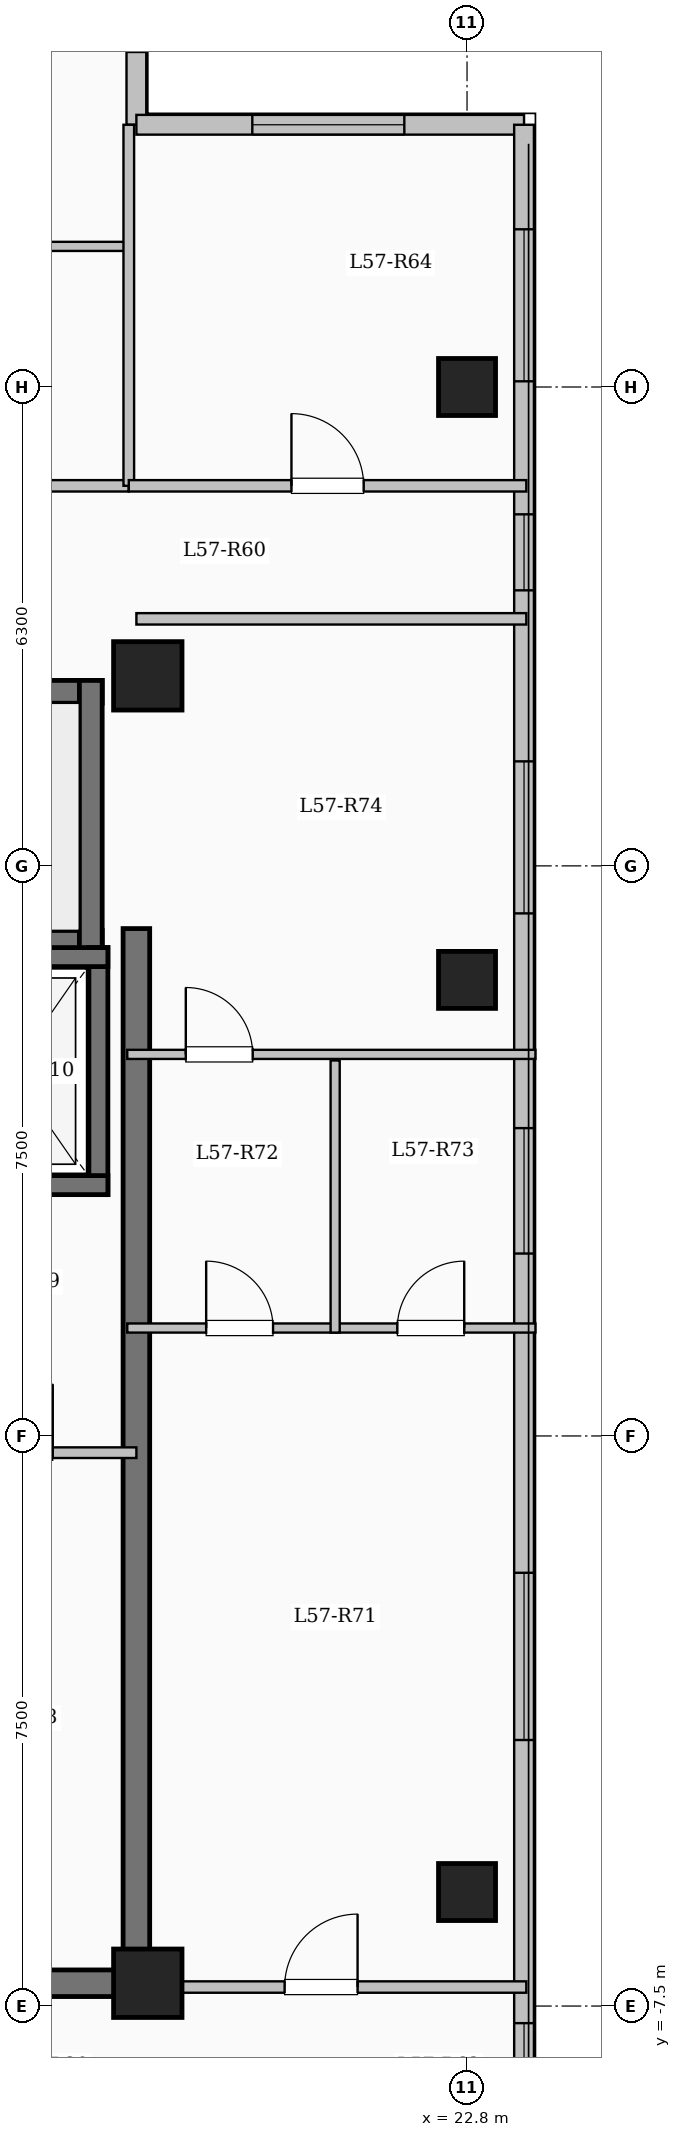
"""IFC4 building model, lengths in metres.
Left out: names, types, materials, properties, quantities, classifications, styles, units other than length and angle.
Written with IfcOpenShell. Run it as: python <this file> out.ifc"""

import sys

from ifc_helpers import new_model, si_unit, direction, frame, frame_2d, origin, origin_2d, place, context, subcontext, project, spatial, rectangle, extrude, element, fill, save


model = new_model("IFC4")
c1 = context("Model", 3, precision=1e-05, world=origin(), true_north=direction((0.0, 1.0)))
c2 = subcontext(c1, "Body", "Model", "MODEL_VIEW")
j1 = project(units=[si_unit("LENGTHUNIT", "METRE"), si_unit("PLANEANGLEUNIT", "RADIAN")], contexts=[c1])
p1 = place(None, origin())
s1 = spatial("IfcSite", under=j1, at=p1, CompositionType="ELEMENT")
p2 = place(p1, origin())
s2 = spatial("IfcBuilding", under=s1, at=p2, CompositionType="ELEMENT")
p3 = place(p2, frame((0.0, 0.0, 210.35)))
s3 = spatial("IfcBuildingStorey", under=s2, at=p3, CompositionType="ELEMENT", Elevation=210.35)
for number, where, z_axis, x_axis in (
    (1, (18.6, -7.2, 0.0), (0.0, 0.0, 1.0), (1.0, 0.0, 0.0)),
    (2, (18.6, 10.0, 0.0), (0.0, 0.0, 1.0), (1.0, 0.0, 0.0)),
):
    element("IfcColumn", number, at=place(p3, frame(where, z_axis=z_axis, x_axis=x_axis)), inside=s3, PredefinedType="COLUMN", context=c2, shape_type="SweptSolid", body=[
        extrude(rectangle(XDim=0.9, YDim=0.9, at=origin_2d()), origin(), (0.0, 0.0, 1.0), 3.35),
    ])
for number, where, z_axis, x_axis in (
    (3, (22.8, -6.0, 0.0), (0.0, 0.0, 1.0), (1.0, 0.0, 0.0)),
    (4, (22.8, 6.0, 0.0), (0.0, 0.0, 1.0), (1.0, 0.0, 0.0)),
    (5, (22.8, 13.8, 0.0), (0.0, 0.0, 1.0), (1.0, 0.0, 0.0)),
):
    element("IfcColumn", number, at=place(p3, frame(where, z_axis=z_axis, x_axis=x_axis)), inside=s3, PredefinedType="COLUMN", context=c2, shape_type="SweptSolid", body=[
        extrude(rectangle(XDim=0.75, YDim=0.75, at=origin_2d()), origin(), (0.0, 0.0, 1.0), 3.35),
    ])
p4 = place(p3, frame((18.45, 20.85, 0.0), z_axis=(0.0, 0.0, 1.0), x_axis=(0.0, -1.0, 0.0)))
e6 = element("IfcWall", 6, at=p4, inside=s3, PredefinedType="SOLIDWALL", context=c2, shape_type="SweptSolid", body=[
    extrude(rectangle(XDim=3.6, YDim=0.26, at=frame_2d((1.8, 0.0))), origin(), (0.0, 0.0, 1.0), 3.1),
])
p5 = place(p4, frame((0.992, 0.0, 0.9)))
e7 = element("IfcOpeningElement", 7, at=p5, cuts=e6, PredefinedType="OPENING", context=c2, shape_type="SweptSolid", body=[
    extrude(rectangle(XDim=1.65, YDim=1.6, at=frame_2d((0.825, 0.8))), frame((0.0, 0.14, 0.0), z_axis=(0.0, -1.0, 0.0), x_axis=(1.0, 0.0, 0.0)), (0.0, 0.0, 1.0), 0.28),
])
p6 = place(p3, frame((18.45, 17.25, 0.0), z_axis=(0.0, 0.0, 1.0), x_axis=(1.0, 0.0, 0.0)))
e8 = element("IfcWall", 8, at=p6, inside=s3, PredefinedType="SOLIDWALL", context=c2, shape_type="SweptSolid", body=[
    extrude(rectangle(XDim=5.1, YDim=0.26, at=frame_2d((2.55, 0.0))), origin(), (0.0, 0.0, 1.0), 3.1),
])
p7 = place(p6, frame((1.525, 0.0, 0.9)))
e9 = element("IfcOpeningElement", 9, at=p7, cuts=e8, PredefinedType="OPENING", context=c2, shape_type="SweptSolid", body=[
    extrude(rectangle(XDim=2.0, YDim=1.7, at=frame_2d((1.0, 0.85))), frame((0.0, 0.14, 0.0), z_axis=(0.0, -1.0, 0.0), x_axis=(1.0, 0.0, 0.0)), (0.0, 0.0, 1.0), 0.28),
])
p8 = place(p3, frame((23.55, 17.25, 0.0), z_axis=(0.0, 0.0, 1.0), x_axis=(0.0, -1.0, 0.0)))
e10 = element("IfcWall", 10, at=p8, inside=s3, PredefinedType="SOLIDWALL", context=c2, shape_type="SweptSolid", body=[
    extrude(rectangle(XDim=34.5, YDim=0.26, at=frame_2d((17.25, 0.0))), origin(), (0.0, 0.0, 1.0), 3.1),
])
p9 = place(p8, frame((1.375, 0.0, 0.9)))
e11 = element("IfcOpeningElement", 11, at=p9, cuts=e10, PredefinedType="OPENING", context=c2, shape_type="SweptSolid", body=[
    extrude(rectangle(XDim=2.0, YDim=1.7, at=frame_2d((1.0, 0.85))), frame((0.0, 0.14, 0.0), z_axis=(0.0, -1.0, 0.0), x_axis=(1.0, 0.0, 0.0)), (0.0, 0.0, 1.0), 0.28),
])
p10 = place(p8, frame((5.125, 0.0, 0.95)))
e12 = element("IfcOpeningElement", 12, at=p10, cuts=e10, PredefinedType="OPENING", context=c2, shape_type="SweptSolid", body=[
    extrude(rectangle(XDim=1.0, YDim=1.5, at=frame_2d((0.5, 0.75))), frame((0.0, 0.14, 0.0), z_axis=(0.0, -1.0, 0.0), x_axis=(1.0, 0.0, 0.0)), (0.0, 0.0, 1.0), 0.28),
])
p11 = place(p8, frame((8.375, 0.0, 0.9)))
e13 = element("IfcOpeningElement", 13, at=p11, cuts=e10, PredefinedType="OPENING", context=c2, shape_type="SweptSolid", body=[
    extrude(rectangle(XDim=2.0, YDim=1.7, at=frame_2d((1.0, 0.85))), frame((0.0, 0.14, 0.0), z_axis=(0.0, -1.0, 0.0), x_axis=(1.0, 0.0, 0.0)), (0.0, 0.0, 1.0), 0.28),
])
p12 = place(p8, frame((13.2, 0.0, 0.9)))
e14 = element("IfcOpeningElement", 14, at=p12, cuts=e10, PredefinedType="OPENING", context=c2, shape_type="SweptSolid", body=[
    extrude(rectangle(XDim=1.65, YDim=1.6, at=frame_2d((0.825, 0.8))), frame((0.0, 0.14, 0.0), z_axis=(0.0, -1.0, 0.0), x_axis=(1.0, 0.0, 0.0)), (0.0, 0.0, 1.0), 0.28),
])
p13 = place(p8, frame((19.05, 0.0, 0.9)))
e15 = element("IfcOpeningElement", 15, at=p13, cuts=e10, PredefinedType="OPENING", context=c2, shape_type="SweptSolid", body=[
    extrude(rectangle(XDim=2.2, YDim=1.75, at=frame_2d((1.1, 0.875))), frame((0.0, 0.14, 0.0), z_axis=(0.0, -1.0, 0.0), x_axis=(1.0, 0.0, 0.0)), (0.0, 0.0, 1.0), 0.28),
])
p14 = place(p8, frame((24.975, 0.0, 0.95)))
e16 = element("IfcOpeningElement", 16, at=p14, cuts=e10, PredefinedType="OPENING", context=c2, shape_type="SweptSolid", body=[
    extrude(rectangle(XDim=1.2, YDim=1.5, at=frame_2d((0.6, 0.75))), frame((0.0, 0.14, 0.0), z_axis=(0.0, -1.0, 0.0), x_axis=(1.0, 0.0, 0.0)), (0.0, 0.0, 1.0), 0.28),
])
p15 = place(p8, frame((29.475, 0.0, 0.9)))
e17 = element("IfcOpeningElement", 17, at=p15, cuts=e10, PredefinedType="OPENING", context=c2, shape_type="SweptSolid", body=[
    extrude(rectangle(XDim=2.2, YDim=1.75, at=frame_2d((1.1, 0.875))), frame((0.0, 0.14, 0.0), z_axis=(0.0, -1.0, 0.0), x_axis=(1.0, 0.0, 0.0)), (0.0, 0.0, 1.0), 0.28),
])
p16 = place(p3, frame((10.0, 9.79, 0.0), z_axis=(0.0, 0.0, 1.0), x_axis=(1.0, 0.0, 0.0)))
e18 = element("IfcWall", 18, at=p16, inside=s3, PredefinedType="SHEAR", context=c2, shape_type="SweptSolid", body=[
    extrude(rectangle(XDim=8.0, YDim=0.3, at=frame_2d((4.0, 0.0))), origin(), (0.0, 0.0, 1.0), 3.35),
])
p17 = place(p3, frame((10.0, 6.5, 0.0), z_axis=(0.0, 0.0, 1.0), x_axis=(1.0, 0.0, 0.0)))
e19 = element("IfcWall", 19, at=p17, inside=s3, PredefinedType="SHEAR", context=c2, shape_type="SweptSolid", body=[
    extrude(rectangle(XDim=8.0, YDim=0.3, at=frame_2d((4.0, 0.0))), origin(), (0.0, 0.0, 1.0), 3.35),
])
p18 = place(p17, frame((0.55, 0.0, 0.0)))
e20 = element("IfcOpeningElement", 20, at=p18, cuts=e19, PredefinedType="OPENING", context=c2, shape_type="SweptSolid", body=[
    extrude(rectangle(XDim=1.0, YDim=2.15, at=frame_2d((0.5, 1.075))), frame((0.0, 0.16, 0.0), z_axis=(0.0, -1.0, 0.0), x_axis=(1.0, 0.0, 0.0)), (0.0, 0.0, 1.0), 0.32),
])
p19 = place(p3, frame((17.85, 6.35, 0.0), z_axis=(0.0, 0.0, 1.0), x_axis=(0.0, 1.0, 0.0)))
e21 = element("IfcWall", 21, at=p19, inside=s3, PredefinedType="SHEAR", context=c2, shape_type="SweptSolid", body=[
    extrude(rectangle(XDim=3.59, YDim=0.3, at=frame_2d((1.795, 0.0))), origin(), (0.0, 0.0, 1.0), 3.35),
])
p20 = place(p3, frame((17.95, 3.175, 0.0), z_axis=(0.0, 0.0, 1.0), x_axis=(0.0, 1.0, 0.0)))
e22 = element("IfcWall", 22, at=p20, inside=s3, PredefinedType="SHEAR", context=c2, shape_type="SweptSolid", body=[
    extrude(rectangle(XDim=3.25, YDim=0.25, at=frame_2d((1.625, 0.0))), origin(), (0.0, 0.0, 1.0), 3.35),
])
for number, where, z_axis, x_axis in (
    (23, (15.525, 3.3, 0.0), (0.0, 0.0, 1.0), (1.0, 0.0, 0.0)),
    (24, (15.525, 6.3, 0.0), (0.0, 0.0, 1.0), (1.0, 0.0, 0.0)),
):
    element("IfcWall", number, at=place(p3, frame(where, z_axis=z_axis, x_axis=x_axis)), inside=s3, PredefinedType="SHEAR", context=c2, shape_type="SweptSolid", body=[
        extrude(rectangle(XDim=2.55, YDim=0.25, at=frame_2d((1.275, 0.0))), origin(), (0.0, 0.0, 1.0), 3.35),
    ])
p21 = place(p3, frame((18.45, -7.375, 0.0), z_axis=(0.0, 0.0, 1.0), x_axis=(0.0, 1.0, 0.0)))
e25 = element("IfcWall", 25, at=p21, inside=s3, PredefinedType="SHEAR", context=c2, shape_type="SweptSolid", body=[
    extrude(rectangle(XDim=14.05, YDim=0.35, at=frame_2d((7.025, 0.0))), origin(), (0.0, 0.0, 1.0), 3.35),
])
p22 = place(p3, frame((12.625, -7.2, 0.0), z_axis=(0.0, 0.0, 1.0), x_axis=(1.0, 0.0, 0.0)))
e26 = element("IfcWall", 26, at=p22, inside=s3, PredefinedType="SHEAR", context=c2, shape_type="SweptSolid", body=[
    extrude(rectangle(XDim=6.0, YDim=0.35, at=frame_2d((3.0, 0.0))), origin(), (0.0, 0.0, 1.0), 3.35),
])
p23 = place(p3, frame((15.4, -0.22, 0.0), z_axis=(0.0, 0.0, 1.0), x_axis=(1.0, 0.0, 0.0)))
e27 = element("IfcWall", 27, at=p23, inside=s3, PredefinedType="PARTITIONING", context=c2, shape_type="SweptSolid", body=[
    extrude(rectangle(XDim=3.05, YDim=0.14, at=frame_2d((1.525, 0.0))), origin(), (0.0, 0.0, 1.0), 3.1),
])
p24 = place(p23, frame((1.05, 0.0, 0.0)))
e28 = element("IfcOpeningElement", 28, at=p24, cuts=e27, PredefinedType="OPENING", context=c2, shape_type="SweptSolid", body=[
    extrude(rectangle(XDim=0.9, YDim=2.08, at=frame_2d((0.45, 1.04))), frame((0.0, 0.08, 0.0), z_axis=(0.0, -1.0, 0.0), x_axis=(1.0, 0.0, 0.0)), (0.0, 0.0, 1.0), 0.16),
])
p25 = place(p3, frame((3.85, 12.5, 0.0), z_axis=(0.0, 0.0, 1.0), x_axis=(1.0, 0.0, 0.0)))
e29 = element("IfcWall", 29, at=p25, inside=s3, PredefinedType="PARTITIONING", context=c2, shape_type="SweptSolid", body=[
    extrude(rectangle(XDim=14.5, YDim=0.15, at=frame_2d((7.25, 0.0))), origin(), (0.0, 0.0, 1.0), 3.1),
])
p26 = place(p25, frame((1.45, 0.0, 0.0)))
e30 = element("IfcOpeningElement", 30, at=p26, cuts=e29, PredefinedType="OPENING", context=c2, shape_type="SweptSolid", body=[
    extrude(rectangle(XDim=0.96, YDim=2.15, at=frame_2d((0.48, 1.075))), frame((0.0, 0.085, 0.0), z_axis=(0.0, -1.0, 0.0), x_axis=(1.0, 0.0, 0.0)), (0.0, 0.0, 1.0), 0.17),
])
p27 = place(p25, frame((6.35, 0.0, 0.0)))
e31 = element("IfcOpeningElement", 31, at=p27, cuts=e29, PredefinedType="OPENING", context=c2, shape_type="SweptSolid", body=[
    extrude(rectangle(XDim=0.96, YDim=2.15, at=frame_2d((0.48, 1.075))), frame((0.0, 0.085, 0.0), z_axis=(0.0, -1.0, 0.0), x_axis=(1.0, 0.0, 0.0)), (0.0, 0.0, 1.0), 0.17),
])
p28 = place(p3, frame((13.865, 15.65, 0.0), z_axis=(0.0, 0.0, 1.0), x_axis=(1.0, 0.0, 0.0)))
e32 = element("IfcWall", 32, at=p28, inside=s3, PredefinedType="PARTITIONING", context=c2, shape_type="SweptSolid", body=[
    extrude(rectangle(XDim=4.545, YDim=0.12, at=frame_2d((2.272, 0.0))), origin(), (0.0, 0.0, 1.0), 2.725),
])
p29 = place(p3, frame((18.45, -7.25, 0.0), z_axis=(0.0, 0.0, 1.0), x_axis=(1.0, 0.0, 0.0)))
e33 = element("IfcWall", 33, at=p29, inside=s3, PredefinedType="PARTITIONING", context=c2, shape_type="SweptSolid", body=[
    extrude(rectangle(XDim=5.13, YDim=0.15, at=frame_2d((2.565, 0.0))), origin(), (0.0, 0.0, 1.0), 3.1),
])
p30 = place(p29, frame((1.95, 0.0, 0.0)))
e34 = element("IfcOpeningElement", 34, at=p30, cuts=e33, PredefinedType="OPENING", context=c2, shape_type="SweptSolid", body=[
    extrude(rectangle(XDim=0.96, YDim=2.15, at=frame_2d((0.48, 1.075))), frame((0.0, 0.085, 0.0), z_axis=(0.0, -1.0, 0.0), x_axis=(1.0, 0.0, 0.0)), (0.0, 0.0, 1.0), 0.17),
])
p31 = place(p3, frame((18.45, 10.75, 0.0), z_axis=(0.0, 0.0, 1.0), x_axis=(1.0, 0.0, 0.0)))
e35 = element("IfcWall", 35, at=p31, inside=s3, PredefinedType="PARTITIONING", context=c2, shape_type="SweptSolid", body=[
    extrude(rectangle(XDim=5.13, YDim=0.15, at=frame_2d((2.565, 0.0))), origin(), (0.0, 0.0, 1.0), 3.1),
])
p32 = place(p3, frame((18.35, 12.5, 0.0), z_axis=(0.0, 0.0, 1.0), x_axis=(0.0, 1.0, 0.0)))
e36 = element("IfcWall", 36, at=p32, inside=s3, PredefinedType="PARTITIONING", context=c2, shape_type="SweptSolid", body=[
    extrude(rectangle(XDim=4.75, YDim=0.14, at=frame_2d((2.375, 0.0))), origin(), (0.0, 0.0, 1.0), 3.1),
])
p33 = place(p3, frame((18.35, 12.5, 0.0), z_axis=(0.0, 0.0, 1.0), x_axis=(1.0, 0.0, 0.0)))
e37 = element("IfcWall", 37, at=p33, inside=s3, PredefinedType="PARTITIONING", context=c2, shape_type="SweptSolid", body=[
    extrude(rectangle(XDim=5.23, YDim=0.15, at=frame_2d((2.615, 0.0))), origin(), (0.0, 0.0, 1.0), 3.1),
])
p34 = place(p33, frame((2.14, 0.0, 0.0)))
e38 = element("IfcOpeningElement", 38, at=p34, cuts=e37, PredefinedType="OPENING", context=c2, shape_type="SweptSolid", body=[
    extrude(rectangle(XDim=0.95, YDim=2.15, at=frame_2d((0.475, 1.075))), frame((0.0, 0.085, 0.0), z_axis=(0.0, -1.0, 0.0), x_axis=(1.0, 0.0, 0.0)), (0.0, 0.0, 1.0), 0.17),
])
p35 = place(p3, frame((18.33, 1.42, 0.0), z_axis=(0.0, 0.0, 1.0), x_axis=(1.0, 0.0, 0.0)))
e39 = element("IfcWall", 39, at=p35, inside=s3, PredefinedType="PARTITIONING", context=c2, shape_type="SweptSolid", body=[
    extrude(rectangle(XDim=5.37, YDim=0.12, at=frame_2d((2.685, 0.0))), origin(), (0.0, 0.0, 1.0), 3.1),
])
p36 = place(p35, frame((1.038, 0.0, 0.0)))
e40 = element("IfcOpeningElement", 40, at=p36, cuts=e39, PredefinedType="OPENING", context=c2, shape_type="SweptSolid", body=[
    extrude(rectangle(XDim=0.88, YDim=2.1, at=frame_2d((0.44, 1.05))), frame((0.0, 0.07, 0.0), z_axis=(0.0, -1.0, 0.0), x_axis=(1.0, 0.0, 0.0)), (0.0, 0.0, 1.0), 0.14),
])
p37 = place(p35, frame((3.553, 0.0, 0.0)))
e41 = element("IfcOpeningElement", 41, at=p37, cuts=e39, PredefinedType="OPENING", context=c2, shape_type="SweptSolid", body=[
    extrude(rectangle(XDim=0.88, YDim=2.1, at=frame_2d((0.44, 1.05))), frame((0.0, 0.07, 0.0), z_axis=(0.0, -1.0, 0.0), x_axis=(1.0, 0.0, 0.0)), (0.0, 0.0, 1.0), 0.14),
])
p38 = place(p3, frame((18.33, 5.02, 0.0), z_axis=(0.0, 0.0, 1.0), x_axis=(1.0, 0.0, 0.0)))
e42 = element("IfcWall", 42, at=p38, inside=s3, PredefinedType="PARTITIONING", context=c2, shape_type="SweptSolid", body=[
    extrude(rectangle(XDim=5.37, YDim=0.12, at=frame_2d((2.685, 0.0))), origin(), (0.0, 0.0, 1.0), 3.1),
])
p39 = place(p38, frame((0.77, 0.0, 0.0)))
e43 = element("IfcOpeningElement", 43, at=p39, cuts=e42, PredefinedType="OPENING", context=c2, shape_type="SweptSolid", body=[
    extrude(rectangle(XDim=0.88, YDim=2.1, at=frame_2d((0.44, 1.05))), frame((0.0, 0.07, 0.0), z_axis=(0.0, -1.0, 0.0), x_axis=(1.0, 0.0, 0.0)), (0.0, 0.0, 1.0), 0.14),
])
p40 = place(p3, frame((21.065, 1.36, 0.0), z_axis=(0.0, 0.0, 1.0), x_axis=(0.0, 1.0, 0.0)))
e44 = element("IfcWall", 44, at=p40, inside=s3, PredefinedType="PARTITIONING", context=c2, shape_type="SweptSolid", body=[
    extrude(rectangle(XDim=3.58, YDim=0.12, at=frame_2d((1.79, 0.0))), origin(), (0.0, 0.0, 1.0), 3.1),
])
p41 = place(p7, origin())
e45 = element("IfcWindow", 45, at=p41, inside=s3, PartitioningType="SINGLE_PANEL", PredefinedType="WINDOW", context=c2, shape_type="SweptSolid", body=[
    extrude(rectangle(XDim=2.0, YDim=1.7, at=frame_2d((1.0, 0.85))), frame((0.0, 0.03, 0.0), z_axis=(0.0, -1.0, 0.0), x_axis=(1.0, 0.0, 0.0)), (0.0, 0.0, 1.0), 0.06),
])
fill(e9, e45)
p42 = place(p9, origin())
e46 = element("IfcWindow", 46, at=p42, inside=s3, PartitioningType="SINGLE_PANEL", PredefinedType="WINDOW", context=c2, shape_type="SweptSolid", body=[
    extrude(rectangle(XDim=2.0, YDim=1.7, at=frame_2d((1.0, 0.85))), frame((0.0, 0.03, 0.0), z_axis=(0.0, -1.0, 0.0), x_axis=(1.0, 0.0, 0.0)), (0.0, 0.0, 1.0), 0.06),
])
fill(e11, e46)
p43 = place(p10, origin())
e47 = element("IfcWindow", 47, at=p43, inside=s3, PartitioningType="SINGLE_PANEL", PredefinedType="WINDOW", context=c2, shape_type="SweptSolid", body=[
    extrude(rectangle(XDim=1.0, YDim=1.5, at=frame_2d((0.5, 0.75))), frame((0.0, 0.03, 0.0), z_axis=(0.0, -1.0, 0.0), x_axis=(1.0, 0.0, 0.0)), (0.0, 0.0, 1.0), 0.06),
])
fill(e12, e47)
p44 = place(p11, origin())
e48 = element("IfcWindow", 48, at=p44, inside=s3, PartitioningType="SINGLE_PANEL", PredefinedType="WINDOW", context=c2, shape_type="SweptSolid", body=[
    extrude(rectangle(XDim=2.0, YDim=1.7, at=frame_2d((1.0, 0.85))), frame((0.0, 0.03, 0.0), z_axis=(0.0, -1.0, 0.0), x_axis=(1.0, 0.0, 0.0)), (0.0, 0.0, 1.0), 0.06),
])
fill(e13, e48)
p45 = place(p12, origin())
e49 = element("IfcWindow", 49, at=p45, inside=s3, PartitioningType="SINGLE_PANEL", PredefinedType="WINDOW", context=c2, shape_type="SweptSolid", body=[
    extrude(rectangle(XDim=1.65, YDim=1.6, at=frame_2d((0.825, 0.8))), frame((0.0, 0.03, 0.0), z_axis=(0.0, -1.0, 0.0), x_axis=(1.0, 0.0, 0.0)), (0.0, 0.0, 1.0), 0.06),
])
fill(e14, e49)
p46 = place(p13, origin())
e50 = element("IfcWindow", 50, at=p46, inside=s3, PartitioningType="SINGLE_PANEL", PredefinedType="WINDOW", context=c2, shape_type="SweptSolid", body=[
    extrude(rectangle(XDim=2.2, YDim=1.75, at=frame_2d((1.1, 0.875))), frame((0.0, 0.03, 0.0), z_axis=(0.0, -1.0, 0.0), x_axis=(1.0, 0.0, 0.0)), (0.0, 0.0, 1.0), 0.06),
])
fill(e15, e50)
p47 = place(p14, origin())
e51 = element("IfcWindow", 51, at=p47, inside=s3, PartitioningType="SINGLE_PANEL", PredefinedType="WINDOW", context=c2, shape_type="SweptSolid", body=[
    extrude(rectangle(XDim=1.2, YDim=1.5, at=frame_2d((0.6, 0.75))), frame((0.0, 0.03, 0.0), z_axis=(0.0, -1.0, 0.0), x_axis=(1.0, 0.0, 0.0)), (0.0, 0.0, 1.0), 0.06),
])
fill(e16, e51)
p48 = place(p34, origin())
e52 = element("IfcDoor", 52, at=p48, inside=s3, OperationType="SINGLE_SWING_LEFT", PredefinedType="DOOR", context=c2, shape_type="SweptSolid", body=[
    extrude(rectangle(XDim=0.95, YDim=2.15, at=frame_2d((0.475, 1.075))), frame((0.0, 0.025, 0.0), z_axis=(0.0, -1.0, 0.0), x_axis=(1.0, 0.0, 0.0)), (0.0, 0.0, 1.0), 0.05),
])
fill(e38, e52)
p49 = place(p30, origin())
e53 = element("IfcDoor", 53, at=p49, inside=s3, OperationType="SINGLE_SWING_RIGHT", PredefinedType="DOOR", context=c2, shape_type="SweptSolid", body=[
    extrude(rectangle(XDim=0.96, YDim=2.15, at=frame_2d((0.48, 1.075))), frame((0.0, 0.025, 0.0), z_axis=(0.0, -1.0, 0.0), x_axis=(1.0, 0.0, 0.0)), (0.0, 0.0, 1.0), 0.05),
])
fill(e34, e53)
p50 = place(p36, origin())
e54 = element("IfcDoor", 54, at=p50, inside=s3, OperationType="SINGLE_SWING_LEFT", PredefinedType="DOOR", context=c2, shape_type="SweptSolid", body=[
    extrude(rectangle(XDim=0.88, YDim=2.1, at=frame_2d((0.44, 1.05))), frame((0.0, 0.025, 0.0), z_axis=(0.0, -1.0, 0.0), x_axis=(1.0, 0.0, 0.0)), (0.0, 0.0, 1.0), 0.05),
])
fill(e40, e54)
p51 = place(p37, origin())
e55 = element("IfcDoor", 55, at=p51, inside=s3, OperationType="SINGLE_SWING_RIGHT", PredefinedType="DOOR", context=c2, shape_type="SweptSolid", body=[
    extrude(rectangle(XDim=0.88, YDim=2.1, at=frame_2d((0.44, 1.05))), frame((0.0, 0.025, 0.0), z_axis=(0.0, -1.0, 0.0), x_axis=(1.0, 0.0, 0.0)), (0.0, 0.0, 1.0), 0.05),
])
fill(e41, e55)
p52 = place(p39, origin())
e56 = element("IfcDoor", 56, at=p52, inside=s3, OperationType="SINGLE_SWING_LEFT", PredefinedType="DOOR", context=c2, shape_type="SweptSolid", body=[
    extrude(rectangle(XDim=0.88, YDim=2.1, at=frame_2d((0.44, 1.05))), frame((0.0, 0.025, 0.0), z_axis=(0.0, -1.0, 0.0), x_axis=(1.0, 0.0, 0.0)), (0.0, 0.0, 1.0), 0.05),
])
fill(e43, e56)
save(model, sys.argv[1])
